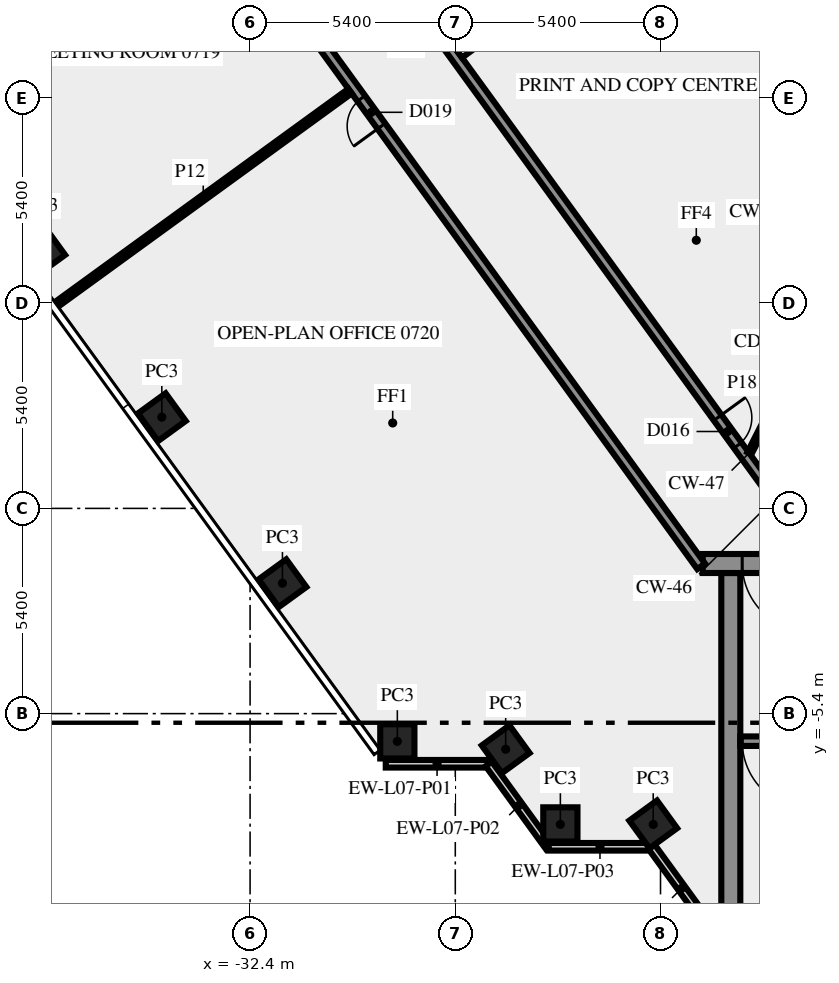
"""IFC4 building model, lengths in metres.
Left out: names, types, materials, properties, quantities, classifications, styles, units other than length and angle.
Written with IfcOpenShell. Run it as: python <this file> out.ifc"""

import sys

from ifc_helpers import new_model, si_unit, direction, frame, frame_2d, origin, origin_2d, place, context, subcontext, project, spatial, rectangle, extrude, element, fill, save


model = new_model("IFC4")
c1 = context("Model", 3, precision=1e-05, world=origin(), true_north=direction((0.0, 1.0)))
c2 = subcontext(c1, "Body", "Model", "MODEL_VIEW")
j1 = project(units=[si_unit("LENGTHUNIT", "METRE"), si_unit("PLANEANGLEUNIT", "RADIAN")], contexts=[c1])
p1 = place(None, origin())
s1 = spatial("IfcSite", under=j1, at=p1, CompositionType="ELEMENT")
p2 = place(p1, origin())
s2 = spatial("IfcBuilding", under=s1, at=p2, CompositionType="ELEMENT")
p3 = place(p2, frame((0.0, 0.0, 35.0)))
s3 = spatial("IfcBuildingStorey", under=s2, at=p3, CompositionType="ELEMENT", Elevation=35.0)
for number, where, z_axis, x_axis in (
    (1, (-37.896, 6.769, 0.0), (0.0, 0.0, 1.0), (0.588, -0.809, 0.0)),
    (2, (-34.722, 2.4, 0.0), (0.0, 0.0, 1.0), (0.588, -0.809, 0.0)),
    (3, (-31.548, -1.969, 0.0), (0.0, 0.0, 1.0), (0.588, -0.809, 0.0)),
    (4, (-28.525, -6.13, 0.0), (0.0, 0.0, 1.0), (1.0, 0.0, 0.0)),
    (5, (-25.674, -6.337, 0.0), (0.0, 0.0, 1.0), (0.588, -0.809, 0.0)),
    (6, (-24.235, -8.315, 0.0), (0.0, 0.0, 1.0), (1.0, 0.0, 0.0)),
    (7, (-21.792, -8.315, 0.0), (0.0, 0.0, 1.0), (0.588, -0.809, 0.0)),
):
    element("IfcColumn", number, at=place(p3, frame(where, z_axis=z_axis, x_axis=x_axis)), inside=s3, PredefinedType="COLUMN", context=c2, shape_type="SweptSolid", body=[
        extrude(rectangle(XDim=0.9, YDim=0.9, at=origin_2d()), origin(), (0.0, 0.0, 1.0), 3.65),
    ])
p4 = place(p3, frame((-28.83, -6.719, 0.0), z_axis=(0.0, 0.0, 1.0), x_axis=(1.0, 0.0, 0.0)))
e8 = element("IfcWall", 8, at=p4, inside=s3, PredefinedType="SOLIDWALL", context=c2, shape_type="SweptSolid", body=[
    extrude(rectangle(XDim=2.7, YDim=0.2, at=frame_2d((1.35, 0.0))), origin(), (0.0, 0.0, 1.0), 3.65),
])
p5 = place(p3, frame((-26.12, -6.724, 0.0), z_axis=(0.0, 0.0, 1.0), x_axis=(0.587720002413, -0.809064397168, 0.0)))
e9 = element("IfcWall", 9, at=p5, inside=s3, PredefinedType="SOLIDWALL", context=c2, shape_type="SweptSolid", body=[
    extrude(rectangle(XDim=2.7, YDim=0.2, at=frame_2d((1.35, 0.0))), origin(), (0.0, 0.0, 1.0), 3.65),
])
p6 = place(p3, frame((-24.543, -8.904, 0.0), z_axis=(0.0, 0.0, 1.0), x_axis=(1.0, 0.0, 0.0)))
e10 = element("IfcWall", 10, at=p6, inside=s3, PredefinedType="SOLIDWALL", context=c2, shape_type="SweptSolid", body=[
    extrude(rectangle(XDim=2.7, YDim=0.2, at=frame_2d((1.35, 0.0))), origin(), (0.0, 0.0, 1.0), 3.65),
])
p7 = place(p3, frame((-21.833, -8.909, 0.0), z_axis=(0.0, 0.0, 1.0), x_axis=(0.587766567315, -0.809030569476, 0.0)))
e11 = element("IfcWall", 11, at=p7, inside=s3, PredefinedType="SOLIDWALL", context=c2, shape_type="SweptSolid", body=[
    extrude(rectangle(XDim=2.688, YDim=0.2, at=frame_2d((1.344, 0.0))), origin(), (0.0, 0.0, 1.0), 3.65),
])
p8 = place(p3, frame((-19.75, -10.5, 0.0), z_axis=(0.0, 0.0, 1.0), x_axis=(0.0, 1.0, 0.0)))
e12 = element("IfcWall", 12, at=p8, inside=s3, PredefinedType="SHEAR", context=c2, shape_type="SweptSolid", body=[
    extrude(rectangle(XDim=8.8, YDim=0.5, at=frame_2d((4.4, 0.0))), origin(), (0.0, 0.0, 1.0), 3.65),
])
p9 = place(p3, frame((-11.45, -6.125, 0.0), z_axis=(0.0, 0.0, 1.0), x_axis=(-1.0, 0.0, 0.0)))
e13 = element("IfcWall", 13, at=p9, inside=s3, PredefinedType="SHEAR", context=c2, shape_type="SweptSolid", body=[
    extrude(rectangle(XDim=8.05, YDim=0.25, at=frame_2d((4.025, 0.0))), origin(), (0.0, 0.0, 1.0), 3.65),
])
p10 = place(p9, frame((6.2, 0.0, 0.0)))
e14 = element("IfcOpeningElement", 14, at=p10, cuts=e13, PredefinedType="OPENING", context=c2, shape_type="SweptSolid", body=[
    extrude(rectangle(XDim=1.8, YDim=2.1, at=frame_2d((0.9, 1.05))), frame((0.0, 0.135, 0.0), z_axis=(0.0, -1.0, 0.0), x_axis=(1.0, 0.0, 0.0)), (0.0, 0.0, 1.0), 0.27),
])
p11 = place(p3, frame((20.49, -1.45, 0.0), z_axis=(0.0, 0.0, 1.0), x_axis=(-1.0, 0.0, 0.0)))
e15 = element("IfcWall", 15, at=p11, inside=s3, PredefinedType="SHEAR", context=c2, shape_type="SweptSolid", body=[
    extrude(rectangle(XDim=40.98, YDim=0.5, at=frame_2d((20.49, 0.0))), origin(), (0.0, 0.0, 1.0), 3.65),
])
p12 = place(p11, frame((38.14, 0.0, 0.0)))
e16 = element("IfcOpeningElement", 16, at=p12, cuts=e15, PredefinedType="OPENING", context=c2, shape_type="SweptSolid", body=[
    extrude(rectangle(XDim=1.8, YDim=2.1, at=frame_2d((0.9, 1.05))), frame((0.0, 0.26, 0.0), z_axis=(0.0, -1.0, 0.0), x_axis=(1.0, 0.0, 0.0)), (0.0, 0.0, 1.0), 0.52),
])
p13 = place(p11, frame((36.728, 0.0, 0.0)))
e17 = element("IfcOpeningElement", 17, at=p13, cuts=e15, PredefinedType="OPENING", context=c2, shape_type="SweptSolid", body=[
    extrude(rectangle(XDim=0.8, YDim=2.1, at=frame_2d((0.4, 1.05))), frame((0.0, 0.26, 0.0), z_axis=(0.0, -1.0, 0.0), x_axis=(1.0, 0.0, 0.0)), (0.0, 0.0, 1.0), 0.52),
])
p14 = place(p11, frame((35.153, 0.0, 0.0)))
e18 = element("IfcOpeningElement", 18, at=p14, cuts=e15, PredefinedType="OPENING", context=c2, shape_type="SweptSolid", body=[
    extrude(rectangle(XDim=0.8, YDim=2.1, at=frame_2d((0.4, 1.05))), frame((0.0, 0.26, 0.0), z_axis=(0.0, -1.0, 0.0), x_axis=(1.0, 0.0, 0.0)), (0.0, 0.0, 1.0), 0.52),
])
p15 = place(p11, frame((32.94, 0.0, 0.0)))
e19 = element("IfcOpeningElement", 19, at=p15, cuts=e15, PredefinedType="OPENING", context=c2, shape_type="SweptSolid", body=[
    extrude(rectangle(XDim=0.9, YDim=2.1, at=frame_2d((0.45, 1.05))), frame((0.0, 0.26, 0.0), z_axis=(0.0, -1.0, 0.0), x_axis=(1.0, 0.0, 0.0)), (0.0, 0.0, 1.0), 0.52),
])
p16 = place(p11, frame((21.765, 0.0, 0.0)))
e20 = element("IfcOpeningElement", 20, at=p16, cuts=e15, PredefinedType="OPENING", context=c2, shape_type="SweptSolid", body=[
    extrude(rectangle(XDim=2.0, YDim=2.1, at=frame_2d((1.0, 1.05))), frame((0.0, 0.26, 0.0), z_axis=(0.0, -1.0, 0.0), x_axis=(1.0, 0.0, 0.0)), (0.0, 0.0, 1.0), 0.52),
])
p17 = place(p11, frame((7.14, 0.0, 0.0)))
e21 = element("IfcOpeningElement", 21, at=p17, cuts=e15, PredefinedType="OPENING", context=c2, shape_type="SweptSolid", body=[
    extrude(rectangle(XDim=0.9, YDim=2.1, at=frame_2d((0.45, 1.05))), frame((0.0, 0.26, 0.0), z_axis=(0.0, -1.0, 0.0), x_axis=(1.0, 0.0, 0.0)), (0.0, 0.0, 1.0), 0.52),
])
p18 = place(p11, frame((4.19, 0.0, 0.0)))
e22 = element("IfcOpeningElement", 22, at=p18, cuts=e15, PredefinedType="OPENING", context=c2, shape_type="SweptSolid", body=[
    extrude(rectangle(XDim=0.9, YDim=2.1, at=frame_2d((0.45, 1.05))), frame((0.0, 0.26, 0.0), z_axis=(0.0, -1.0, 0.0), x_axis=(1.0, 0.0, 0.0)), (0.0, 0.0, 1.0), 0.52),
])
p19 = place(p11, frame((1.04, 0.0, 0.0)))
e23 = element("IfcOpeningElement", 23, at=p19, cuts=e15, PredefinedType="OPENING", context=c2, shape_type="SweptSolid", body=[
    extrude(rectangle(XDim=1.8, YDim=2.1, at=frame_2d((0.9, 1.05))), frame((0.0, 0.26, 0.0), z_axis=(0.0, -1.0, 0.0), x_axis=(1.0, 0.0, 0.0)), (0.0, 0.0, 1.0), 0.52),
])
p20 = place(p3, frame((-20.531, -1.523, 0.0), z_axis=(0.0, 0.0, 1.0), x_axis=(-0.587784593204, 0.809017473231, 0.0)))
e24 = element("IfcWall", 24, at=p20, inside=s3, PredefinedType="SOLIDWALL", context=c2, shape_type="SweptSolid", body=[
    extrude(rectangle(XDim=44.67, YDim=0.25, at=frame_2d((22.335, 0.0))), origin(), (0.0, 0.0, 1.0), 3.65),
])
p21 = place(p20, frame((30.765, 0.0, 0.0)))
e25 = element("IfcOpeningElement", 25, at=p21, cuts=e24, PredefinedType="OPENING", context=c2, shape_type="SweptSolid", body=[
    extrude(rectangle(XDim=0.9, YDim=2.1, at=frame_2d((0.45, 1.05))), frame((0.0, 0.135, 0.0), z_axis=(0.0, -1.0, 0.0), x_axis=(1.0, 0.0, 0.0)), (0.0, 0.0, 1.0), 0.27),
])
p22 = place(p20, frame((14.316, 0.0, 0.0)))
e26 = element("IfcOpeningElement", 26, at=p22, cuts=e24, PredefinedType="OPENING", context=c2, shape_type="SweptSolid", body=[
    extrude(rectangle(XDim=0.9, YDim=2.1, at=frame_2d((0.45, 1.05))), frame((0.0, 0.135, 0.0), z_axis=(0.0, -1.0, 0.0), x_axis=(1.0, 0.0, 0.0)), (0.0, 0.0, 1.0), 0.27),
])
p23 = place(p20, frame((29.166, 0.0, 0.0)))
e27 = element("IfcOpeningElement", 27, at=p23, cuts=e24, PredefinedType="OPENING", context=c2, shape_type="SweptSolid", body=[
    extrude(rectangle(XDim=0.9, YDim=2.1, at=frame_2d((0.45, 1.05))), frame((0.0, 0.135, 0.0), z_axis=(0.0, -1.0, 0.0), x_axis=(1.0, 0.0, 0.0)), (0.0, 0.0, 1.0), 0.27),
])
p24 = place(p3, frame((-37.232, 25.972, 0.0), z_axis=(0.0, 0.0, 1.0), x_axis=(0.587786323093, -0.809016216391, 0.0)))
e28 = element("IfcWall", 28, at=p24, inside=s3, PredefinedType="SOLIDWALL", context=c2, shape_type="SweptSolid", body=[
    extrude(rectangle(XDim=33.493, YDim=0.25, at=frame_2d((16.747, 0.0))), origin(), (0.0, 0.0, 1.0), 3.65),
])
p25 = place(p24, frame((8.335, 0.0, 0.0)))
e29 = element("IfcOpeningElement", 29, at=p25, cuts=e28, PredefinedType="OPENING", context=c2, shape_type="SweptSolid", body=[
    extrude(rectangle(XDim=0.9, YDim=2.1, at=frame_2d((0.45, 1.05))), frame((0.0, 0.135, 0.0), z_axis=(0.0, -1.0, 0.0), x_axis=(1.0, 0.0, 0.0)), (0.0, 0.0, 1.0), 0.27),
])
p26 = place(p24, frame((29.152, 0.0, 0.0)))
e30 = element("IfcOpeningElement", 30, at=p26, cuts=e28, PredefinedType="OPENING", context=c2, shape_type="SweptSolid", body=[
    extrude(rectangle(XDim=0.9, YDim=2.1, at=frame_2d((0.45, 1.05))), frame((0.0, 0.135, 0.0), z_axis=(0.0, -1.0, 0.0), x_axis=(1.0, 0.0, 0.0)), (0.0, 0.0, 1.0), 0.27),
])
p27 = place(p24, frame((6.735, 0.0, 0.0)))
e31 = element("IfcOpeningElement", 31, at=p27, cuts=e28, PredefinedType="OPENING", context=c2, shape_type="SweptSolid", body=[
    extrude(rectangle(XDim=0.9, YDim=2.1, at=frame_2d((0.45, 1.05))), frame((0.0, 0.135, 0.0), z_axis=(0.0, -1.0, 0.0), x_axis=(1.0, 0.0, 0.0)), (0.0, 0.0, 1.0), 0.27),
])
p28 = place(p3, frame((-26.882, 11.94, 0.0), z_axis=(0.0, 0.0, 1.0), x_axis=(0.807664588563, 0.589642190131, 0.0)))
e32 = element("IfcWall", 32, at=p28, inside=s3, PredefinedType="SOLIDWALL", context=c2, shape_type="SweptSolid", body=[
    extrude(rectangle(XDim=9.55, YDim=0.2, at=frame_2d((4.775, 0.0))), origin(), (0.0, 0.0, 1.0), 2.75),
])
p29 = place(p3, frame((-29.769, 10.98, 0.0), z_axis=(0.0, 0.0, 1.0), x_axis=(-0.809048817734, -0.587741448702, 0.0)))
e33 = element("IfcWall", 33, at=p29, inside=s3, PredefinedType="PARTITIONING", context=c2, shape_type="SweptSolid", body=[
    extrude(rectangle(XDim=9.55, YDim=0.15, at=frame_2d((4.775, 0.0))), origin(), (0.0, 0.0, 1.0), 2.75),
])
p30 = place(p3, frame((-19.261, 1.45, 0.0), z_axis=(0.0, 0.0, 1.0), x_axis=(0.453950796792, 0.891026752736, 0.0)))
e34 = element("IfcWall", 34, at=p30, inside=s3, PredefinedType="PARTITIONING", context=c2, shape_type="SweptSolid", body=[
    extrude(rectangle(XDim=2.778, YDim=0.12, at=frame_2d((1.389, 0.0))), origin(), (0.0, 0.0, 1.0), 3.65),
])
p31 = place(p10, origin())
e35 = element("IfcDoor", 35, at=p31, inside=s3, OperationType="DOUBLE_DOOR_SINGLE_SWING", PredefinedType="DOOR", context=c2, shape_type="SweptSolid", body=[
    extrude(rectangle(XDim=1.8, YDim=2.1, at=frame_2d((0.9, 1.05))), frame((0.0, 0.025, 0.0), z_axis=(0.0, -1.0, 0.0), x_axis=(1.0, 0.0, 0.0)), (0.0, 0.0, 1.0), 0.05),
])
fill(e14, e35)
p32 = place(p12, origin())
e36 = element("IfcDoor", 36, at=p32, inside=s3, OperationType="DOUBLE_DOOR_SINGLE_SWING", PredefinedType="DOOR", context=c2, shape_type="SweptSolid", body=[
    extrude(rectangle(XDim=1.8, YDim=2.1, at=frame_2d((0.9, 1.05))), frame((0.0, 0.025, 0.0), z_axis=(0.0, -1.0, 0.0), x_axis=(1.0, 0.0, 0.0)), (0.0, 0.0, 1.0), 0.05),
])
fill(e16, e36)
p33 = place(p22, origin())
e37 = element("IfcDoor", 37, at=p33, inside=s3, OperationType="SINGLE_SWING_RIGHT", PredefinedType="DOOR", context=c2, shape_type="SweptSolid", body=[
    extrude(rectangle(XDim=0.9, YDim=2.1, at=frame_2d((0.45, 1.05))), frame((0.0, 0.025, 0.0), z_axis=(0.0, -1.0, 0.0), x_axis=(1.0, 0.0, 0.0)), (0.0, 0.0, 1.0), 0.05),
])
fill(e26, e37)
p34 = place(p26, origin())
e38 = element("IfcDoor", 38, at=p34, inside=s3, OperationType="SINGLE_SWING_RIGHT", PredefinedType="DOOR", context=c2, shape_type="SweptSolid", body=[
    extrude(rectangle(XDim=0.9, YDim=2.1, at=frame_2d((0.45, 1.05))), frame((0.0, 0.025, 0.0), z_axis=(0.0, -1.0, 0.0), x_axis=(1.0, 0.0, 0.0)), (0.0, 0.0, 1.0), 0.05),
])
fill(e30, e38)
save(model, sys.argv[1])
